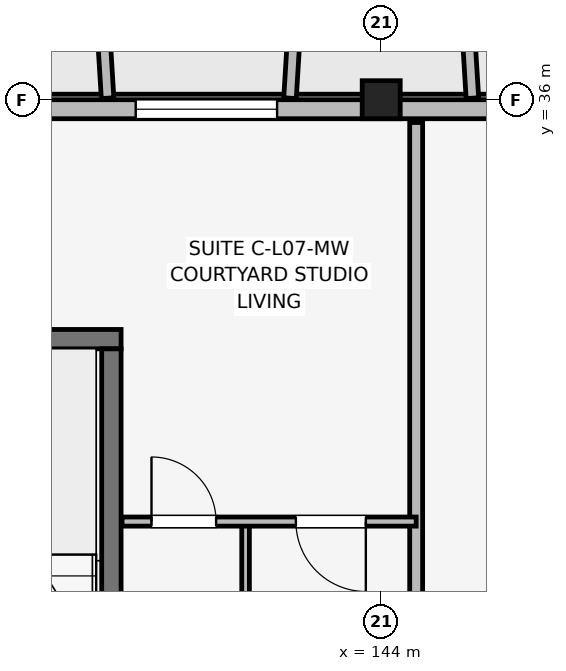
"""IFC4 building model, lengths in metres.
Left out: names, types, materials, properties, quantities, classifications, styles, units other than length and angle.
Written with IfcOpenShell. Run it as: python <this file> out.ifc"""

import sys

from ifc_helpers import new_model, si_unit, direction, frame, frame_2d, origin, origin_2d, place, context, subcontext, project, spatial, rectangle, extrude, element, fill, save


model = new_model("IFC4")
c1 = context("Model", 3, precision=1e-05, world=origin(), true_north=direction((0.0, 1.0)))
c2 = subcontext(c1, "Body", "Model", "MODEL_VIEW")
j1 = project(units=[si_unit("LENGTHUNIT", "METRE"), si_unit("PLANEANGLEUNIT", "RADIAN")], contexts=[c1])
p1 = place(None, origin())
s1 = spatial("IfcSite", under=j1, at=p1, CompositionType="ELEMENT")
p2 = place(p1, origin())
s2 = spatial("IfcBuilding", under=s1, at=p2, CompositionType="ELEMENT")
p3 = place(p2, frame((0.0, 0.0, 24.45)))
s3 = spatial("IfcBuildingStorey", under=s2, at=p3, CompositionType="ELEMENT", Elevation=24.45)
p4 = place(p3, frame((144.0, 36.0, 0.0), z_axis=(0.0, 0.0, 1.0), x_axis=(1.0, 0.0, 0.0)))
e1 = element("IfcColumn", 1, at=p4, inside=s3, PredefinedType="COLUMN", context=c2, shape_type="SweptSolid", body=[
    extrude(rectangle(XDim=0.5, YDim=0.5, at=origin_2d()), origin(), (0.0, 0.0, 1.0), 3.15),
])
p5 = place(p3, frame((137.272, 32.85, 0.0), z_axis=(0.0, 0.0, 1.0), x_axis=(1.0, 0.0, 0.0)))
e2 = element("IfcWall", 2, at=p5, inside=s3, PredefinedType="SHEAR", context=c2, shape_type="SweptSolid", body=[
    extrude(rectangle(XDim=3.305, YDim=0.255, at=frame_2d((1.652, 0.0))), origin(), (0.0, 0.0, 1.0), 3.15),
])
p6 = place(p3, frame((140.45, 26.427, 0.0), z_axis=(0.0, 0.0, 1.0), x_axis=(0.0, 1.0, 0.0)))
e3 = element("IfcWall", 3, at=p6, inside=s3, PredefinedType="SHEAR", context=c2, shape_type="SweptSolid", body=[
    extrude(rectangle(XDim=6.295, YDim=0.255, at=frame_2d((3.147, 0.0))), origin(), (0.0, 0.0, 1.0), 3.15),
])
p7 = place(p3, frame((162.6, 35.875, 0.0), z_axis=(0.0, 0.0, 1.0), x_axis=(-1.0, 0.0, 0.0)))
e4 = element("IfcWall", 4, at=p7, inside=s3, PredefinedType="SOLIDWALL", context=c2, shape_type="SweptSolid", body=[
    extrude(rectangle(XDim=30.0, YDim=0.25, at=frame_2d((15.0, 0.0))), origin(), (0.0, 0.0, 1.0), 2.43),
])
p8 = place(p7, frame((29.1, 0.0, 0.0), z_axis=(0.0, 0.0, 1.0), x_axis=(-1.0, 0.0, 0.0)))
e5 = element("IfcOpeningElement", 5, at=p8, cuts=e4, PredefinedType="OPENING", context=c2, shape_type="SweptSolid", body=[
    extrude(rectangle(XDim=1.8, YDim=2.15, at=frame_2d((0.9, 1.075))), frame((0.0, 0.135, 0.0), z_axis=(0.0, -1.0, 0.0), x_axis=(1.0, 0.0, 0.0)), (0.0, 0.0, 1.0), 0.27),
])
p9 = place(p7, frame((2.55, 0.0, 0.0), z_axis=(0.0, 0.0, 1.0), x_axis=(-1.0, 0.0, 0.0)))
e6 = element("IfcOpeningElement", 6, at=p9, cuts=e4, PredefinedType="OPENING", context=c2, shape_type="SweptSolid", body=[
    extrude(rectangle(XDim=1.5, YDim=2.15, at=frame_2d((0.75, 1.075))), frame((0.0, 0.135, 0.0), z_axis=(0.0, -1.0, 0.0), x_axis=(1.0, 0.0, 0.0)), (0.0, 0.0, 1.0), 0.27),
])
p10 = place(p7, frame((15.355, 0.0, 0.5)))
e7 = element("IfcOpeningElement", 7, at=p10, cuts=e4, PredefinedType="OPENING", context=c2, shape_type="SweptSolid", body=[
    extrude(rectangle(XDim=0.9, YDim=1.8, at=frame_2d((0.45, 0.9))), frame((0.0, 0.135, 0.0), z_axis=(0.0, -1.0, 0.0), x_axis=(1.0, 0.0, 0.0)), (0.0, 0.0, 1.0), 0.27),
])
p11 = place(p7, frame((8.145, 0.0, 0.7)))
e8 = element("IfcOpeningElement", 8, at=p11, cuts=e4, PredefinedType="OPENING", context=c2, shape_type="SweptSolid", body=[
    extrude(rectangle(XDim=1.86, YDim=1.6, at=frame_2d((0.93, 0.8))), frame((0.0, 0.135, 0.0), z_axis=(0.0, -1.0, 0.0), x_axis=(1.0, 0.0, 0.0)), (0.0, 0.0, 1.0), 0.27),
])
p12 = place(p7, frame((19.97, 0.0, 0.7)))
e9 = element("IfcOpeningElement", 9, at=p12, cuts=e4, PredefinedType="OPENING", context=c2, shape_type="SweptSolid", body=[
    extrude(rectangle(XDim=1.86, YDim=1.6, at=frame_2d((0.93, 0.8))), frame((0.0, 0.135, 0.0), z_axis=(0.0, -1.0, 0.0), x_axis=(1.0, 0.0, 0.0)), (0.0, 0.0, 1.0), 0.27),
])
for number, where, z_axis, x_axis in (
    (10, (140.4, 36.02, 0.0), (0.0, 0.0, 1.0), (-0.061, 0.998, 0.0)),
    (11, (142.8, 36.02, 0.0), (0.0, 0.0, 1.0), (0.061, 0.998, 0.0)),
):
    element("IfcWall", number, at=place(p3, frame(where, z_axis=z_axis, x_axis=x_axis)), inside=s3, PredefinedType="ELEMENTEDWALL", context=c2, shape_type="SweptSolid", body=[
        extrude(rectangle(XDim=1.964, YDim=0.165, at=frame_2d((0.982, 0.0))), origin(), (0.0, 0.0, 1.0), 2.45),
    ])
p13 = place(p3, frame((145.2, 36.02, 0.0), z_axis=(0.0, 0.0, 1.0), x_axis=(-0.061046865508, 0.998134900808, 0.0)))
e12 = element("IfcWall", 12, at=p13, inside=s3, PredefinedType="ELEMENTEDWALL", context=c2, shape_type="SweptSolid", body=[
    extrude(rectangle(XDim=1.964, YDim=0.165, at=frame_2d((0.982, 0.0))), origin(), (0.0, 0.0, 1.0), 2.48),
])
p14 = place(p3, frame((144.46, 26.1, 0.0), z_axis=(0.0, 0.0, 1.0), x_axis=(0.0, 1.0, 0.0)))
e13 = element("IfcWall", 13, at=p14, inside=s3, PredefinedType="PARTITIONING", context=c2, shape_type="SweptSolid", body=[
    extrude(rectangle(XDim=9.6, YDim=0.17, at=frame_2d((4.8, 0.0))), origin(), (0.0, 0.0, 1.0), 2.38),
])
p15 = place(p3, frame((142.215, 26.1, 0.0), z_axis=(0.0, 0.0, 1.0), x_axis=(0.0, 1.0, 0.0)))
e14 = element("IfcWall", 14, at=p15, inside=s3, PredefinedType="PARTITIONING", context=c2, shape_type="SweptSolid", body=[
    extrude(rectangle(XDim=4.35, YDim=0.1, at=frame_2d((2.175, 0.0))), origin(), (0.0, 0.0, 1.0), 2.38),
])
p16 = place(p3, frame((140.59, 30.45, 0.0), z_axis=(0.0, 0.0, 1.0), x_axis=(1.0, 0.0, 0.0)))
e15 = element("IfcWall", 15, at=p16, inside=s3, PredefinedType="PARTITIONING", context=c2, shape_type="SweptSolid", body=[
    extrude(rectangle(XDim=3.87, YDim=0.12, at=frame_2d((1.935, 0.0))), origin(), (0.0, 0.0, 1.0), 2.38),
])
p17 = place(p16, frame((0.388, 0.0, 0.0)))
e16 = element("IfcOpeningElement", 16, at=p17, cuts=e15, PredefinedType="OPENING", context=c2, shape_type="SweptSolid", body=[
    extrude(rectangle(XDim=0.85, YDim=2.08, at=frame_2d((0.425, 1.04))), frame((0.0, 0.07, 0.0), z_axis=(0.0, -1.0, 0.0), x_axis=(1.0, 0.0, 0.0)), (0.0, 0.0, 1.0), 0.14),
])
p18 = place(p16, frame((3.208, 0.0, 0.0), z_axis=(0.0, 0.0, 1.0), x_axis=(-1.0, 0.0, 0.0)))
e17 = element("IfcOpeningElement", 17, at=p18, cuts=e15, PredefinedType="OPENING", context=c2, shape_type="SweptSolid", body=[
    extrude(rectangle(XDim=0.92, YDim=2.08, at=frame_2d((0.46, 1.04))), frame((0.0, 0.07, 0.0), z_axis=(0.0, -1.0, 0.0), x_axis=(1.0, 0.0, 0.0)), (0.0, 0.0, 1.0), 0.14),
])
p19 = place(p12, origin())
e18 = element("IfcWindow", 18, at=p19, inside=s3, PartitioningType="SINGLE_PANEL", PredefinedType="WINDOW", context=c2, shape_type="SweptSolid", body=[
    extrude(rectangle(XDim=1.86, YDim=1.6, at=frame_2d((0.93, 0.8))), frame((0.0, 0.03, 0.0), z_axis=(0.0, -1.0, 0.0), x_axis=(1.0, 0.0, 0.0)), (0.0, 0.0, 1.0), 0.06),
])
fill(e9, e18)
p20 = place(p17, origin())
e19 = element("IfcDoor", 19, at=p20, inside=s3, OperationType="SINGLE_SWING_LEFT", PredefinedType="DOOR", context=c2, shape_type="SweptSolid", body=[
    extrude(rectangle(XDim=0.85, YDim=2.08, at=frame_2d((0.425, 1.04))), frame((0.0, 0.025, 0.0), z_axis=(0.0, -1.0, 0.0), x_axis=(1.0, 0.0, 0.0)), (0.0, 0.0, 1.0), 0.05),
])
fill(e16, e19)
p21 = place(p18, origin())
e20 = element("IfcDoor", 20, at=p21, inside=s3, OperationType="SINGLE_SWING_RIGHT", PredefinedType="DOOR", context=c2, shape_type="SweptSolid", body=[
    extrude(rectangle(XDim=0.92, YDim=2.08, at=frame_2d((0.46, 1.04))), frame((0.0, 0.025, 0.0), z_axis=(0.0, -1.0, 0.0), x_axis=(1.0, 0.0, 0.0)), (0.0, 0.0, 1.0), 0.05),
])
fill(e17, e20)
save(model, sys.argv[1])
